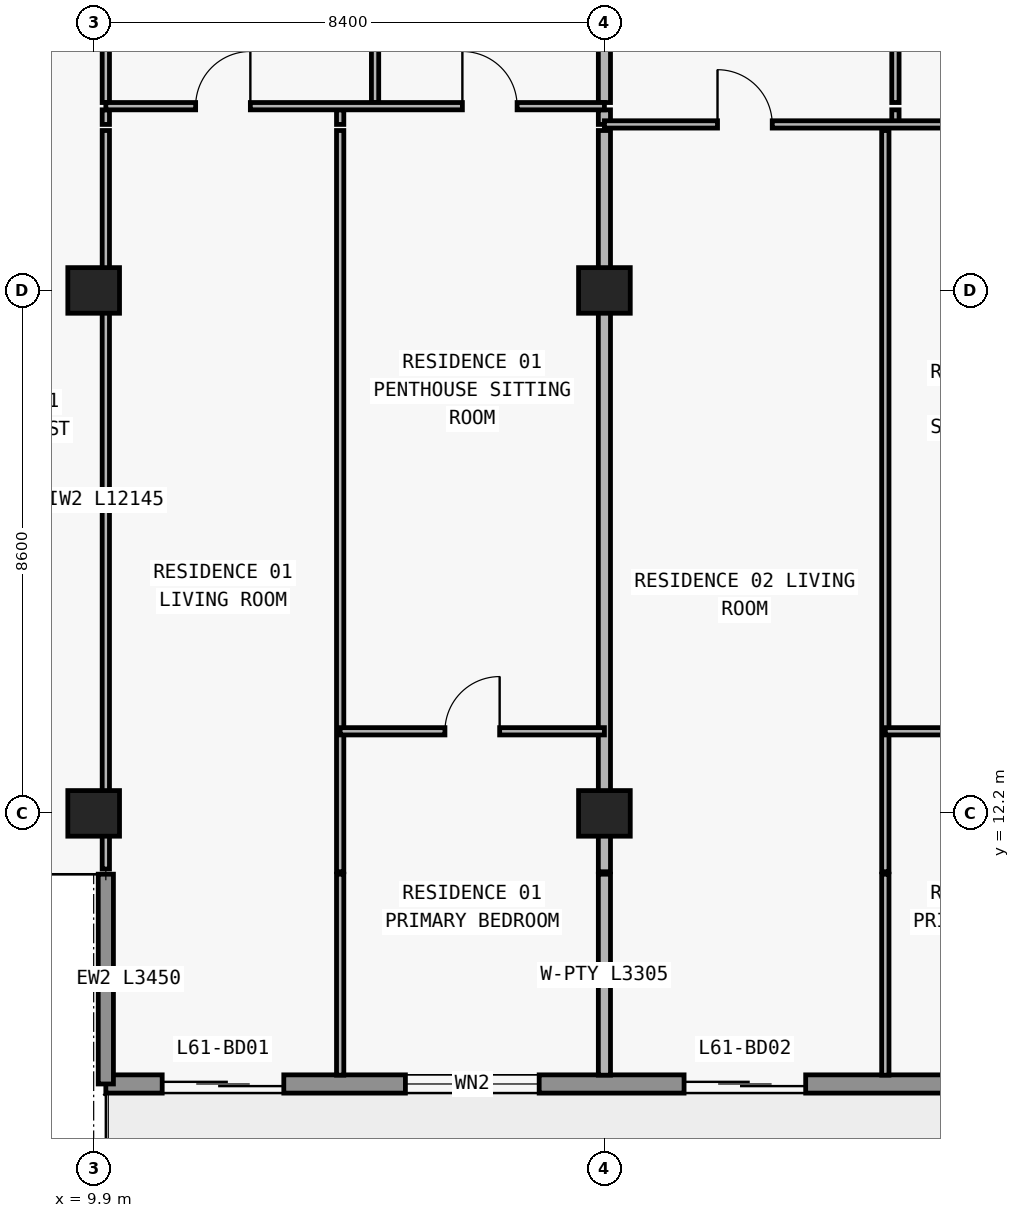
"""IFC4 building model, lengths in metres.
Left out: names, types, materials, properties, quantities, classifications, styles, units other than length and angle.
Written with IfcOpenShell. Run it as: python <this file> out.ifc"""

import sys

from ifc_helpers import new_model, si_unit, direction, frame, frame_2d, origin, origin_2d, place, context, subcontext, project, spatial, rectangle, extrude, element, fill, save


model = new_model("IFC4")
c1 = context("Model", 3, precision=1e-05, world=origin(), true_north=direction((0.0, 1.0)))
c2 = subcontext(c1, "Body", "Model", "MODEL_VIEW")
j1 = project(units=[si_unit("LENGTHUNIT", "METRE"), si_unit("PLANEANGLEUNIT", "RADIAN")], contexts=[c1])
p1 = place(None, origin())
s1 = spatial("IfcSite", under=j1, at=p1, CompositionType="ELEMENT")
p2 = place(p1, origin())
s2 = spatial("IfcBuilding", under=s1, at=p2, CompositionType="ELEMENT")
p3 = place(p2, frame((0.0, 0.0, 218.1)))
s3 = spatial("IfcBuildingStorey", under=s2, at=p3, CompositionType="ELEMENT", Elevation=218.1)
for number, where, z_axis, x_axis in (
    (1, (9.9, 12.2, 0.0), (0.0, 0.0, 1.0), (1.0, 0.0, 0.0)),
    (2, (18.3, 12.2, 0.0), (0.0, 0.0, 1.0), (1.0, 0.0, 0.0)),
    (3, (9.9, 20.8, 0.0), (0.0, 0.0, 1.0), (1.0, 0.0, 0.0)),
    (4, (18.3, 20.8, 0.0), (0.0, 0.0, 1.0), (1.0, 0.0, 0.0)),
):
    element("IfcColumn", number, at=place(p3, frame(where, z_axis=z_axis, x_axis=x_axis)), inside=s3, PredefinedType="COLUMN", context=c2, shape_type="SweptSolid", body=[
        extrude(rectangle(XDim=0.85, YDim=0.75, at=origin_2d()), origin(), (0.0, 0.0, 1.0), 3.0),
    ])
p4 = place(p3, frame((67.7, 7.75, 0.0), z_axis=(0.0, 0.0, 1.0), x_axis=(-1.0, 0.0, 0.0)))
e5 = element("IfcWall", 5, at=p4, inside=s3, PredefinedType="STANDARD", context=c2, shape_type="SweptSolid", body=[
    extrude(rectangle(XDim=57.6, YDim=0.3, at=frame_2d((28.8, 0.0))), origin(), (0.0, 0.0, 1.0), 3.0),
])
p5 = place(p4, frame((54.673, 0.0, 0.0)))
e6 = element("IfcOpeningElement", 6, at=p5, cuts=e5, PredefinedType="OPENING", context=c2, shape_type="SweptSolid", body=[
    extrude(rectangle(XDim=2.0, YDim=2.3, at=frame_2d((1.0, 1.15))), frame((0.0, 0.16, 0.0), z_axis=(0.0, -1.0, 0.0), x_axis=(1.0, 0.0, 0.0)), (0.0, 0.0, 1.0), 0.32),
])
p6 = place(p4, frame((50.473, 0.0, 0.85)))
e7 = element("IfcOpeningElement", 7, at=p6, cuts=e5, PredefinedType="OPENING", context=c2, shape_type="SweptSolid", body=[
    extrude(rectangle(XDim=2.2, YDim=1.55, at=frame_2d((1.1, 0.775))), frame((0.0, 0.16, 0.0), z_axis=(0.0, -1.0, 0.0), x_axis=(1.0, 0.0, 0.0)), (0.0, 0.0, 1.0), 0.32),
])
p7 = place(p4, frame((46.09, 0.0, 0.0)))
e8 = element("IfcOpeningElement", 8, at=p7, cuts=e5, PredefinedType="OPENING", context=c2, shape_type="SweptSolid", body=[
    extrude(rectangle(XDim=2.0, YDim=2.3, at=frame_2d((1.0, 1.15))), frame((0.0, 0.16, 0.0), z_axis=(0.0, -1.0, 0.0), x_axis=(1.0, 0.0, 0.0)), (0.0, 0.0, 1.0), 0.32),
])
p8 = place(p4, frame((41.99, 0.0, 0.85)))
e9 = element("IfcOpeningElement", 9, at=p8, cuts=e5, PredefinedType="OPENING", context=c2, shape_type="SweptSolid", body=[
    extrude(rectangle(XDim=1.8, YDim=1.55, at=frame_2d((0.9, 0.775))), frame((0.0, 0.16, 0.0), z_axis=(0.0, -1.0, 0.0), x_axis=(1.0, 0.0, 0.0)), (0.0, 0.0, 1.0), 0.32),
])
p9 = place(p4, frame((38.026, 0.0, 0.0)))
e10 = element("IfcOpeningElement", 10, at=p9, cuts=e5, PredefinedType="OPENING", context=c2, shape_type="SweptSolid", body=[
    extrude(rectangle(XDim=2.0, YDim=2.3, at=frame_2d((1.0, 1.15))), frame((0.0, 0.16, 0.0), z_axis=(0.0, -1.0, 0.0), x_axis=(1.0, 0.0, 0.0)), (0.0, 0.0, 1.0), 0.32),
])
p10 = place(p4, frame((33.726, 0.0, 0.85)))
e11 = element("IfcOpeningElement", 11, at=p10, cuts=e5, PredefinedType="OPENING", context=c2, shape_type="SweptSolid", body=[
    extrude(rectangle(XDim=2.2, YDim=1.55, at=frame_2d((1.1, 0.775))), frame((0.0, 0.16, 0.0), z_axis=(0.0, -1.0, 0.0), x_axis=(1.0, 0.0, 0.0)), (0.0, 0.0, 1.0), 0.32),
])
p11 = place(p4, frame((29.51, 0.0, 0.0)))
e12 = element("IfcOpeningElement", 12, at=p11, cuts=e5, PredefinedType="OPENING", context=c2, shape_type="SweptSolid", body=[
    extrude(rectangle(XDim=2.0, YDim=2.3, at=frame_2d((1.0, 1.15))), frame((0.0, 0.16, 0.0), z_axis=(0.0, -1.0, 0.0), x_axis=(1.0, 0.0, 0.0)), (0.0, 0.0, 1.0), 0.32),
])
p12 = place(p4, frame((25.81, 0.0, 0.85)))
e13 = element("IfcOpeningElement", 13, at=p12, cuts=e5, PredefinedType="OPENING", context=c2, shape_type="SweptSolid", body=[
    extrude(rectangle(XDim=1.8, YDim=1.55, at=frame_2d((0.9, 0.775))), frame((0.0, 0.16, 0.0), z_axis=(0.0, -1.0, 0.0), x_axis=(1.0, 0.0, 0.0)), (0.0, 0.0, 1.0), 0.32),
])
p13 = place(p4, frame((22.026, 0.0, 0.0)))
e14 = element("IfcOpeningElement", 14, at=p13, cuts=e5, PredefinedType="OPENING", context=c2, shape_type="SweptSolid", body=[
    extrude(rectangle(XDim=2.0, YDim=2.3, at=frame_2d((1.0, 1.15))), frame((0.0, 0.16, 0.0), z_axis=(0.0, -1.0, 0.0), x_axis=(1.0, 0.0, 0.0)), (0.0, 0.0, 1.0), 0.32),
])
p14 = place(p4, frame((17.726, 0.0, 0.85)))
e15 = element("IfcOpeningElement", 15, at=p14, cuts=e5, PredefinedType="OPENING", context=c2, shape_type="SweptSolid", body=[
    extrude(rectangle(XDim=2.2, YDim=1.55, at=frame_2d((1.1, 0.775))), frame((0.0, 0.16, 0.0), z_axis=(0.0, -1.0, 0.0), x_axis=(1.0, 0.0, 0.0)), (0.0, 0.0, 1.0), 0.32),
])
p15 = place(p4, frame((13.29, 0.0, 0.0)))
e16 = element("IfcOpeningElement", 16, at=p15, cuts=e5, PredefinedType="OPENING", context=c2, shape_type="SweptSolid", body=[
    extrude(rectangle(XDim=2.0, YDim=2.3, at=frame_2d((1.0, 1.15))), frame((0.0, 0.16, 0.0), z_axis=(0.0, -1.0, 0.0), x_axis=(1.0, 0.0, 0.0)), (0.0, 0.0, 1.0), 0.32),
])
p16 = place(p4, frame((9.19, 0.0, 0.85)))
e17 = element("IfcOpeningElement", 17, at=p16, cuts=e5, PredefinedType="OPENING", context=c2, shape_type="SweptSolid", body=[
    extrude(rectangle(XDim=1.8, YDim=1.55, at=frame_2d((0.9, 0.775))), frame((0.0, 0.16, 0.0), z_axis=(0.0, -1.0, 0.0), x_axis=(1.0, 0.0, 0.0)), (0.0, 0.0, 1.0), 0.32),
])
p17 = place(p4, frame((5.273, 0.0, 0.0)))
e18 = element("IfcOpeningElement", 18, at=p17, cuts=e5, PredefinedType="OPENING", context=c2, shape_type="SweptSolid", body=[
    extrude(rectangle(XDim=2.0, YDim=2.3, at=frame_2d((1.0, 1.15))), frame((0.0, 0.16, 0.0), z_axis=(0.0, -1.0, 0.0), x_axis=(1.0, 0.0, 0.0)), (0.0, 0.0, 1.0), 0.32),
])
p18 = place(p4, frame((1.073, 0.0, 0.85)))
e19 = element("IfcOpeningElement", 19, at=p18, cuts=e5, PredefinedType="OPENING", context=c2, shape_type="SweptSolid", body=[
    extrude(rectangle(XDim=2.2, YDim=1.55, at=frame_2d((1.1, 0.775))), frame((0.0, 0.16, 0.0), z_axis=(0.0, -1.0, 0.0), x_axis=(1.0, 0.0, 0.0)), (0.0, 0.0, 1.0), 0.32),
])
p19 = place(p3, frame((10.1, 11.2, 0.0), z_axis=(0.0, 0.0, 1.0), x_axis=(0.0, -1.0, 0.0)))
e20 = element("IfcWall", 20, at=p19, inside=s3, PredefinedType="ELEMENTEDWALL", context=c2, shape_type="SweptSolid", body=[
    extrude(rectangle(XDim=3.45, YDim=0.25, at=frame_2d((1.725, 0.0))), origin(), (0.0, 0.0, 1.0), 3.0),
])
p20 = place(p3, frame((10.1, 11.285, 0.0), z_axis=(0.0, 0.0, 1.0), x_axis=(0.0, 1.0, 0.0)))
e21 = element("IfcWall", 21, at=p20, inside=s3, PredefinedType="PARTITIONING", context=c2, shape_type="SweptSolid", body=[
    extrude(rectangle(XDim=12.145, YDim=0.12, at=frame_2d((6.073, 0.0))), origin(), (0.0, 0.0, 1.0), 2.213),
])
p21 = place(p3, frame((10.1, 23.53, 0.0), z_axis=(0.0, 0.0, 1.0), x_axis=(0.0, 1.0, 0.0)))
e22 = element("IfcWall", 22, at=p21, inside=s3, PredefinedType="PARTITIONING", context=c2, shape_type="SweptSolid", body=[
    extrude(rectangle(XDim=0.24, YDim=0.12, at=frame_2d((0.12, 0.0))), origin(), (0.0, 0.0, 1.0), 2.213),
])
p22 = place(p3, frame((10.1, 23.89, 0.0), z_axis=(0.0, 0.0, 1.0), x_axis=(0.0, 1.0, 0.0)))
e23 = element("IfcWall", 23, at=p22, inside=s3, PredefinedType="PARTITIONING", context=c2, shape_type="SweptSolid", body=[
    extrude(rectangle(XDim=4.69, YDim=0.12, at=frame_2d((2.345, 0.0))), origin(), (0.0, 0.0, 1.0), 2.213),
])
p23 = place(p22, frame((1.895, 0.0, 0.0)))
e24 = element("IfcOpeningElement", 24, at=p23, cuts=e23, PredefinedType="OPENING", context=c2, shape_type="SweptSolid", body=[
    extrude(rectangle(XDim=0.9, YDim=2.15, at=frame_2d((0.45, 1.075))), frame((0.0, 0.07, 0.0), z_axis=(0.0, -1.0, 0.0), x_axis=(1.0, 0.0, 0.0)), (0.0, 0.0, 1.0), 0.14),
])
p24 = place(p3, frame((13.954, 7.895, 0.0), z_axis=(0.0, 0.0, 1.0), x_axis=(0.0, 1.0, 0.0)))
e25 = element("IfcWall", 25, at=p24, inside=s3, PredefinedType="PARTITIONING", context=c2, shape_type="SweptSolid", body=[
    extrude(rectangle(XDim=3.305, YDim=0.12, at=frame_2d((1.652, 0.0))), origin(), (0.0, 0.0, 1.0), 3.0),
])
p25 = place(p3, frame((13.954, 11.24, 0.0), z_axis=(0.0, 0.0, 1.0), x_axis=(0.0, 1.0, 0.0)))
e26 = element("IfcWall", 26, at=p25, inside=s3, PredefinedType="PARTITIONING", context=c2, shape_type="SweptSolid", body=[
    extrude(rectangle(XDim=12.19, YDim=0.12, at=frame_2d((6.095, 0.0))), origin(), (0.0, 0.0, 1.0), 2.449),
])
p26 = place(p3, frame((13.954, 23.53, 0.0), z_axis=(0.0, 0.0, 1.0), x_axis=(0.0, 1.0, 0.0)))
e27 = element("IfcWall", 27, at=p26, inside=s3, PredefinedType="PARTITIONING", context=c2, shape_type="SweptSolid", body=[
    extrude(rectangle(XDim=0.24, YDim=0.12, at=frame_2d((0.12, 0.0))), origin(), (0.0, 0.0, 1.0), 2.449),
])
p27 = place(p3, frame((14.528, 23.89, 0.0), z_axis=(0.0, 0.0, 1.0), x_axis=(0.0, 1.0, 0.0)))
e28 = element("IfcWall", 28, at=p27, inside=s3, PredefinedType="PARTITIONING", context=c2, shape_type="SweptSolid", body=[
    extrude(rectangle(XDim=4.69, YDim=0.12, at=frame_2d((2.345, 0.0))), origin(), (0.0, 0.0, 1.0), 3.0),
])
p28 = place(p27, frame((1.895, 0.0, 0.0)))
e29 = element("IfcOpeningElement", 29, at=p28, cuts=e28, PredefinedType="OPENING", context=c2, shape_type="SweptSolid", body=[
    extrude(rectangle(XDim=0.9, YDim=2.15, at=frame_2d((0.45, 1.075))), frame((0.0, 0.07, 0.0), z_axis=(0.0, -1.0, 0.0), x_axis=(1.0, 0.0, 0.0)), (0.0, 0.0, 1.0), 0.14),
])
p29 = place(p3, frame((18.3, 7.895, 0.0), z_axis=(0.0, 0.0, 1.0), x_axis=(0.0, 1.0, 0.0)))
e30 = element("IfcWall", 30, at=p29, inside=s3, PredefinedType="PARTITIONING", context=c2, shape_type="SweptSolid", body=[
    extrude(rectangle(XDim=3.305, YDim=0.2, at=frame_2d((1.652, 0.0))), origin(), (0.0, 0.0, 1.0), 3.0),
])
p30 = place(p3, frame((18.3, 11.24, 0.0), z_axis=(0.0, 0.0, 1.0), x_axis=(0.0, 1.0, 0.0)))
e31 = element("IfcWall", 31, at=p30, inside=s3, PredefinedType="PARTITIONING", context=c2, shape_type="SweptSolid", body=[
    extrude(rectangle(XDim=12.19, YDim=0.2, at=frame_2d((6.095, 0.0))), origin(), (0.0, 0.0, 1.0), 2.213),
])
p31 = place(p3, frame((18.3, 23.53, 0.0), z_axis=(0.0, 0.0, 1.0), x_axis=(0.0, 1.0, 0.0)))
e32 = element("IfcWall", 32, at=p31, inside=s3, PredefinedType="PARTITIONING", context=c2, shape_type="SweptSolid", body=[
    extrude(rectangle(XDim=0.24, YDim=0.2, at=frame_2d((0.12, 0.0))), origin(), (0.0, 0.0, 1.0), 2.213),
])
p32 = place(p3, frame((18.3, 23.89, 0.0), z_axis=(0.0, 0.0, 1.0), x_axis=(0.0, 1.0, 0.0)))
e33 = element("IfcWall", 33, at=p32, inside=s3, PredefinedType="PARTITIONING", context=c2, shape_type="SweptSolid", body=[
    extrude(rectangle(XDim=4.69, YDim=0.2, at=frame_2d((2.345, 0.0))), origin(), (0.0, 0.0, 1.0), 2.213),
])
p33 = place(p3, frame((22.92, 7.895, 0.0), z_axis=(0.0, 0.0, 1.0), x_axis=(0.0, 1.0, 0.0)))
e34 = element("IfcWall", 34, at=p33, inside=s3, PredefinedType="PARTITIONING", context=c2, shape_type="SweptSolid", body=[
    extrude(rectangle(XDim=3.305, YDim=0.12, at=frame_2d((1.652, 0.0))), origin(), (0.0, 0.0, 1.0), 3.0),
])
p34 = place(p3, frame((22.92, 11.24, 0.0), z_axis=(0.0, 0.0, 1.0), x_axis=(0.0, 1.0, 0.0)))
e35 = element("IfcWall", 35, at=p34, inside=s3, PredefinedType="PARTITIONING", context=c2, shape_type="SweptSolid", body=[
    extrude(rectangle(XDim=12.19, YDim=0.12, at=frame_2d((6.095, 0.0))), origin(), (0.0, 0.0, 1.0), 3.0),
])
p35 = place(p3, frame((23.086, 23.53, 0.0), z_axis=(0.0, 0.0, 1.0), x_axis=(0.0, 1.0, 0.0)))
e36 = element("IfcWall", 36, at=p35, inside=s3, PredefinedType="PARTITIONING", context=c2, shape_type="SweptSolid", body=[
    extrude(rectangle(XDim=0.24, YDim=0.12, at=frame_2d((0.12, 0.0))), origin(), (0.0, 0.0, 1.0), 3.0),
])
p36 = place(p3, frame((23.086, 23.89, 0.0), z_axis=(0.0, 0.0, 1.0), x_axis=(0.0, 1.0, 0.0)))
e37 = element("IfcWall", 37, at=p36, inside=s3, PredefinedType="PARTITIONING", context=c2, shape_type="SweptSolid", body=[
    extrude(rectangle(XDim=4.69, YDim=0.12, at=frame_2d((2.345, 0.0))), origin(), (0.0, 0.0, 1.0), 3.0),
])
p37 = place(p36, frame((1.895, 0.0, 0.0)))
e38 = element("IfcOpeningElement", 38, at=p37, cuts=e37, PredefinedType="OPENING", context=c2, shape_type="SweptSolid", body=[
    extrude(rectangle(XDim=0.9, YDim=2.15, at=frame_2d((0.45, 1.075))), frame((0.0, 0.07, 0.0), z_axis=(0.0, -1.0, 0.0), x_axis=(1.0, 0.0, 0.0)), (0.0, 0.0, 1.0), 0.14),
])
p38 = place(p3, frame((13.954, 13.55, 0.0), z_axis=(0.0, 0.0, 1.0), x_axis=(1.0, 0.0, 0.0)))
e39 = element("IfcWall", 39, at=p38, inside=s3, PredefinedType="PARTITIONING", context=c2, shape_type="SweptSolid", body=[
    extrude(rectangle(XDim=4.346, YDim=0.12, at=frame_2d((2.173, 0.0))), origin(), (0.0, 0.0, 1.0), 3.0),
])
p39 = place(p38, frame((1.723, 0.0, 0.0)))
e40 = element("IfcOpeningElement", 40, at=p39, cuts=e39, PredefinedType="OPENING", context=c2, shape_type="SweptSolid", body=[
    extrude(rectangle(XDim=0.9, YDim=2.15, at=frame_2d((0.45, 1.075))), frame((0.0, 0.07, 0.0), z_axis=(0.0, -1.0, 0.0), x_axis=(1.0, 0.0, 0.0)), (0.0, 0.0, 1.0), 0.14),
])
p40 = place(p3, frame((22.92, 13.55, 0.0), z_axis=(0.0, 0.0, 1.0), x_axis=(1.0, 0.0, 0.0)))
e41 = element("IfcWall", 41, at=p40, inside=s3, PredefinedType="PARTITIONING", context=c2, shape_type="SweptSolid", body=[
    extrude(rectangle(XDim=3.78, YDim=0.12, at=frame_2d((1.89, 0.0))), origin(), (0.0, 0.0, 1.0), 3.0),
])
p41 = place(p40, frame((1.44, 0.0, 0.0)))
e42 = element("IfcOpeningElement", 42, at=p41, cuts=e41, PredefinedType="OPENING", context=c2, shape_type="SweptSolid", body=[
    extrude(rectangle(XDim=0.9, YDim=2.15, at=frame_2d((0.45, 1.075))), frame((0.0, 0.07, 0.0), z_axis=(0.0, -1.0, 0.0), x_axis=(1.0, 0.0, 0.0)), (0.0, 0.0, 1.0), 0.14),
])
p42 = place(p3, frame((18.3, 23.53, 0.0), z_axis=(0.0, 0.0, 1.0), x_axis=(1.0, 0.0, 0.0)))
e43 = element("IfcWall", 43, at=p42, inside=s3, PredefinedType="PARTITIONING", context=c2, shape_type="SweptSolid", body=[
    extrude(rectangle(XDim=8.18, YDim=0.12, at=frame_2d((4.09, 0.0))), origin(), (0.0, 0.0, 1.0), 3.0),
])
p43 = place(p42, frame((1.86, 0.0, 0.0)))
e44 = element("IfcOpeningElement", 44, at=p43, cuts=e43, PredefinedType="OPENING", context=c2, shape_type="SweptSolid", body=[
    extrude(rectangle(XDim=0.9, YDim=2.15, at=frame_2d((0.45, 1.075))), frame((0.0, 0.07, 0.0), z_axis=(0.0, -1.0, 0.0), x_axis=(1.0, 0.0, 0.0)), (0.0, 0.0, 1.0), 0.14),
])
p44 = place(p42, frame((6.033, 0.0, 0.0)))
e45 = element("IfcOpeningElement", 45, at=p44, cuts=e43, PredefinedType="OPENING", context=c2, shape_type="SweptSolid", body=[
    extrude(rectangle(XDim=0.9, YDim=2.15, at=frame_2d((0.45, 1.075))), frame((0.0, 0.07, 0.0), z_axis=(0.0, -1.0, 0.0), x_axis=(1.0, 0.0, 0.0)), (0.0, 0.0, 1.0), 0.14),
])
p45 = place(p3, frame((10.1, 23.83, 0.0), z_axis=(0.0, 0.0, 1.0), x_axis=(1.0, 0.0, 0.0)))
e46 = element("IfcWall", 46, at=p45, inside=s3, PredefinedType="PARTITIONING", context=c2, shape_type="SweptSolid", body=[
    extrude(rectangle(XDim=8.2, YDim=0.12, at=frame_2d((4.1, 0.0))), origin(), (0.0, 0.0, 1.0), 3.0),
])
p46 = place(p45, frame((1.477, 0.0, 0.0)))
e47 = element("IfcOpeningElement", 47, at=p46, cuts=e46, PredefinedType="OPENING", context=c2, shape_type="SweptSolid", body=[
    extrude(rectangle(XDim=0.9, YDim=2.15, at=frame_2d((0.45, 1.075))), frame((0.0, 0.07, 0.0), z_axis=(0.0, -1.0, 0.0), x_axis=(1.0, 0.0, 0.0)), (0.0, 0.0, 1.0), 0.14),
])
p47 = place(p45, frame((5.864, 0.0, 0.0)))
e48 = element("IfcOpeningElement", 48, at=p47, cuts=e46, PredefinedType="OPENING", context=c2, shape_type="SweptSolid", body=[
    extrude(rectangle(XDim=0.9, YDim=2.15, at=frame_2d((0.45, 1.075))), frame((0.0, 0.07, 0.0), z_axis=(0.0, -1.0, 0.0), x_axis=(1.0, 0.0, 0.0)), (0.0, 0.0, 1.0), 0.14),
])
p48 = place(p5, origin())
e49 = element("IfcDoor", 49, at=p48, inside=s3, OperationType="DOUBLE_DOOR_SLIDING", PredefinedType="DOOR", context=c2, shape_type="SweptSolid", body=[
    extrude(rectangle(XDim=2.0, YDim=2.3, at=frame_2d((1.0, 1.15))), frame((0.0, 0.025, 0.0), z_axis=(0.0, -1.0, 0.0), x_axis=(1.0, 0.0, 0.0)), (0.0, 0.0, 1.0), 0.05),
])
fill(e6, e49)
p49 = place(p6, origin())
e50 = element("IfcWindow", 50, at=p49, inside=s3, PartitioningType="SINGLE_PANEL", PredefinedType="WINDOW", context=c2, shape_type="SweptSolid", body=[
    extrude(rectangle(XDim=2.2, YDim=1.55, at=frame_2d((1.1, 0.775))), frame((0.0, 0.03, 0.0), z_axis=(0.0, -1.0, 0.0), x_axis=(1.0, 0.0, 0.0)), (0.0, 0.0, 1.0), 0.06),
])
fill(e7, e50)
p50 = place(p7, origin())
e51 = element("IfcDoor", 51, at=p50, inside=s3, OperationType="DOUBLE_DOOR_SLIDING", PredefinedType="DOOR", context=c2, shape_type="SweptSolid", body=[
    extrude(rectangle(XDim=2.0, YDim=2.3, at=frame_2d((1.0, 1.15))), frame((0.0, 0.025, 0.0), z_axis=(0.0, -1.0, 0.0), x_axis=(1.0, 0.0, 0.0)), (0.0, 0.0, 1.0), 0.05),
])
fill(e8, e51)
p51 = place(p46, origin())
e52 = element("IfcDoor", 52, at=p51, inside=s3, OperationType="SINGLE_SWING_RIGHT", PredefinedType="DOOR", context=c2, shape_type="SweptSolid", body=[
    extrude(rectangle(XDim=0.9, YDim=2.15, at=frame_2d((0.45, 1.075))), frame((0.0, 0.025, 0.0), z_axis=(0.0, -1.0, 0.0), x_axis=(1.0, 0.0, 0.0)), (0.0, 0.0, 1.0), 0.05),
])
fill(e47, e52)
p52 = place(p47, origin())
e53 = element("IfcDoor", 53, at=p52, inside=s3, OperationType="SINGLE_SWING_LEFT", PredefinedType="DOOR", context=c2, shape_type="SweptSolid", body=[
    extrude(rectangle(XDim=0.9, YDim=2.15, at=frame_2d((0.45, 1.075))), frame((0.0, 0.025, 0.0), z_axis=(0.0, -1.0, 0.0), x_axis=(1.0, 0.0, 0.0)), (0.0, 0.0, 1.0), 0.05),
])
fill(e48, e53)
p53 = place(p39, origin())
e54 = element("IfcDoor", 54, at=p53, inside=s3, OperationType="SINGLE_SWING_RIGHT", PredefinedType="DOOR", context=c2, shape_type="SweptSolid", body=[
    extrude(rectangle(XDim=0.9, YDim=2.15, at=frame_2d((0.45, 1.075))), frame((0.0, 0.025, 0.0), z_axis=(0.0, -1.0, 0.0), x_axis=(1.0, 0.0, 0.0)), (0.0, 0.0, 1.0), 0.05),
])
fill(e40, e54)
p54 = place(p43, origin())
e55 = element("IfcDoor", 55, at=p54, inside=s3, OperationType="SINGLE_SWING_LEFT", PredefinedType="DOOR", context=c2, shape_type="SweptSolid", body=[
    extrude(rectangle(XDim=0.9, YDim=2.15, at=frame_2d((0.45, 1.075))), frame((0.0, 0.025, 0.0), z_axis=(0.0, -1.0, 0.0), x_axis=(1.0, 0.0, 0.0)), (0.0, 0.0, 1.0), 0.05),
])
fill(e44, e55)
save(model, sys.argv[1])
